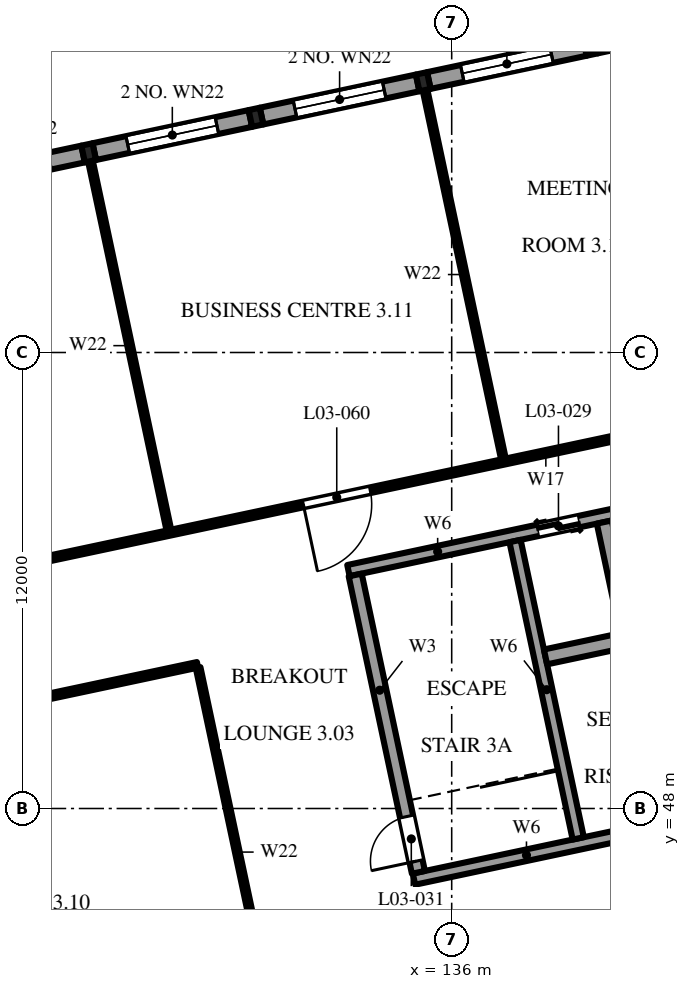
"""IFC4 building model, lengths in metres.
Left out: names, types, materials, properties, quantities, classifications, styles, units other than length and angle.
Written with IfcOpenShell. Run it as: python <this file> out.ifc"""

import sys

from ifc_helpers import new_model, si_unit, direction, frame, frame_2d, origin, origin_2d, place, context, subcontext, project, spatial, polyline, rectangle, i_section, outline, extrude, element, fill, save


model = new_model("IFC4")
c1 = context("Model", 3, precision=1e-05, world=origin(), true_north=direction((0.0, 1.0)))
c2 = subcontext(c1, "Body", "Model", "MODEL_VIEW")
j1 = project(units=[si_unit("LENGTHUNIT", "METRE"), si_unit("PLANEANGLEUNIT", "RADIAN")], contexts=[c1])
p1 = place(None, origin())
s1 = spatial("IfcSite", under=j1, at=p1, CompositionType="ELEMENT")
p2 = place(p1, origin())
s2 = spatial("IfcBuilding", under=s1, at=p2, CompositionType="ELEMENT")
p3 = place(p2, frame((0.0, 0.0, 16.8)))
s3 = spatial("IfcBuildingStorey", under=s2, at=p3, CompositionType="ELEMENT", Elevation=16.8)
for number, where, z_axis, x_axis in (
    (1, (126.448, 65.254, 0.0), (0.0, 0.0, 1.0), (0.978, 0.208, 0.0)),
    (2, (130.849, 66.19, 0.0), (0.0, 0.0, 1.0), (0.978, 0.208, 0.0)),
    (3, (135.251, 67.126, 0.0), (0.0, 0.0, 1.0), (0.978, 0.208, 0.0)),
    (4, (139.653, 68.061, 0.0), (0.0, 0.0, 1.0), (0.978, 0.208, 0.0)),
):
    element("IfcColumn", number, at=place(p3, frame(where, z_axis=z_axis, x_axis=x_axis)), inside=s3, PredefinedType="COLUMN", context=c2, shape_type="SweptSolid", body=[
        extrude(i_section(OverallWidth=0.3, OverallDepth=0.45, WebThickness=0.014, FlangeThickness=0.026, FilletRadius=0.027, at=origin_2d()), origin(), (0.0, 0.0, 1.0), 4.8),
    ])
p4 = place(p3, frame((135.009, 46.142, 0.0), z_axis=(0.0, 0.0, 1.0), x_axis=(0.978147662755, 0.20791139903, 0.0)))
e5 = element("IfcWall", 5, at=p4, inside=s3, PredefinedType="SHEAR", context=c2, shape_type="SweptSolid", body=[
    extrude(outline(polyline([(0.0, 0.0), (13.7, 0.0), (13.7, 11.456), (0.0, 10.723), (0.0, 0.0)])), frame((0.0, 0.15, 0.0), z_axis=(0.0, -1.0, 0.0), x_axis=(1.0, 0.0, 0.0)), (0.0, 0.0, 1.0), 0.3),
])
p5 = place(p4, frame((6.35, 0.0, 0.0)))
e6 = element("IfcOpeningElement", 6, at=p5, cuts=e5, PredefinedType="OPENING", context=c2, shape_type="SweptSolid", body=[
    extrude(rectangle(XDim=1.0, YDim=2.1, at=frame_2d((0.5, 1.05))), frame((0.0, 0.16, 0.0), z_axis=(0.0, -1.0, 0.0), x_axis=(1.0, 0.0, 0.0)), (0.0, 0.0, 1.0), 0.32),
])
p6 = place(p3, frame((133.283, 54.26, 0.0), z_axis=(0.0, 0.0, 1.0), x_axis=(0.978147662755, 0.20791139903, 0.0)))
e7 = element("IfcWall", 7, at=p6, inside=s3, PredefinedType="SHEAR", context=c2, shape_type="SweptSolid", body=[
    extrude(outline(polyline([(0.0, 0.0), (13.7, 0.0), (13.7, 11.021), (0.0, 10.288), (0.0, 0.0)])), frame((0.0, 0.15, 0.0), z_axis=(0.0, -1.0, 0.0), x_axis=(1.0, 0.0, 0.0)), (0.0, 0.0, 1.0), 0.3),
])
p7 = place(p6, frame((5.1, 0.0, 0.0)))
e8 = element("IfcOpeningElement", 8, at=p7, cuts=e7, PredefinedType="OPENING", context=c2, shape_type="SweptSolid", body=[
    extrude(rectangle(XDim=1.1, YDim=2.1, at=frame_2d((0.55, 1.05))), frame((0.0, 0.16, 0.0), z_axis=(0.0, -1.0, 0.0), x_axis=(1.0, 0.0, 0.0)), (0.0, 0.0, 1.0), 0.32),
])
p8 = place(p6, frame((7.5, 0.0, 0.0)))
e9 = element("IfcOpeningElement", 9, at=p8, cuts=e7, PredefinedType="OPENING", context=c2, shape_type="SweptSolid", body=[
    extrude(rectangle(XDim=1.1, YDim=2.1, at=frame_2d((0.55, 1.05))), frame((0.0, 0.16, 0.0), z_axis=(0.0, -1.0, 0.0), x_axis=(1.0, 0.0, 0.0)), (0.0, 0.0, 1.0), 0.32),
])
p9 = place(p3, frame((135.124, 46.32, 0.0), z_axis=(0.0, 0.0, 1.0), x_axis=(-0.207886494942, 0.978152955943, 0.0)))
e10 = element("IfcWall", 10, at=p9, inside=s3, PredefinedType="SOLIDWALL", context=c2, shape_type="SweptSolid", body=[
    extrude(outline(polyline([(0.0, 0.0), (8.0, 0.0), (8.0, 10.304), (0.0, 10.723), (0.0, 0.0)])), frame((0.0, 0.175, 0.0), z_axis=(0.0, -1.0, 0.0), x_axis=(1.0, 0.0, 0.0)), (0.0, 0.0, 1.0), 0.35),
])
p10 = place(p9, frame((0.3, 0.0, 0.0)))
e11 = element("IfcOpeningElement", 11, at=p10, cuts=e10, PredefinedType="OPENING", context=c2, shape_type="SweptSolid", body=[
    extrude(rectangle(XDim=1.2, YDim=2.1, at=frame_2d((0.6, 1.05))), frame((0.0, 0.185, 0.0), z_axis=(0.0, -1.0, 0.0), x_axis=(1.0, 0.0, 0.0)), (0.0, 0.0, 1.0), 0.37),
])
p11 = place(p3, frame((139.33, 47.214, 0.0), z_axis=(0.0, 0.0, 1.0), x_axis=(-0.207915693476, 0.978146749934, 0.0)))
e12 = element("IfcWall", 12, at=p11, inside=s3, PredefinedType="SHEAR", context=c2, shape_type="SweptSolid", body=[
    extrude(outline(polyline([(0.0, 0.0), (8.0, 0.0), (8.0, 10.534), (0.0, 10.953), (0.0, 0.0)])), frame((0.0, 0.15, 0.0), z_axis=(0.0, -1.0, 0.0), x_axis=(1.0, 0.0, 0.0)), (0.0, 0.0, 1.0), 0.3),
])
p12 = place(p3, frame((140.638, 52.603, 0.0), z_axis=(0.0, 0.0, 1.0), x_axis=(-0.207917150959, 0.978146440129, 0.0)))
e13 = element("IfcWall", 13, at=p12, inside=s3, PredefinedType="SHEAR", context=c2, shape_type="SweptSolid", body=[
    extrude(outline(polyline([(0.0, 0.0), (3.0, 0.0), (3.0, 10.662), (0.0, 10.82), (0.0, 0.0)])), frame((0.0, 0.2, 0.0), z_axis=(0.0, -1.0, 0.0), x_axis=(1.0, 0.0, 0.0)), (0.0, 0.0, 1.0), 0.4),
])
p13 = place(p3, frame((138.469, 51.989, 0.0), z_axis=(0.0, 0.0, 1.0), x_axis=(0.978149611564, 0.20790223038, 0.0)))
e14 = element("IfcWall", 14, at=p13, inside=s3, PredefinedType="SHEAR", context=c2, shape_type="SweptSolid", body=[
    extrude(outline(polyline([(0.0, 0.0), (4.5, 0.0), (4.5, 10.948), (0.0, 10.707), (0.0, 0.0)])), frame((0.0, 0.2, 0.0), z_axis=(0.0, -1.0, 0.0), x_axis=(1.0, 0.0, 0.0)), (0.0, 0.0, 1.0), 0.4),
])
p14 = place(p3, frame((122.193, 64.35, 0.0), z_axis=(0.0, 0.0, 1.0), x_axis=(0.978155748334, 0.207873355681, 0.0)))
e15 = element("IfcWall", 15, at=p14, inside=s3, PredefinedType="SOLIDWALL", context=c2, shape_type="SweptSolid", body=[
    extrude(outline(polyline([(0.0, 0.0), (4.2, 0.0), (4.2, 10.707), (0.0, 10.482), (0.0, 0.0)])), frame((0.0, 0.225, 0.0), z_axis=(0.0, -1.0, 0.0), x_axis=(1.0, 0.0, 0.0)), (0.0, 0.0, 1.0), 0.45),
])
p15 = place(p14, frame((0.9, 0.0, 0.9)))
e16 = element("IfcOpeningElement", 16, at=p15, cuts=e15, PredefinedType="OPENING", context=c2, shape_type="SweptSolid", body=[
    extrude(rectangle(XDim=2.4, YDim=2.4, at=frame_2d((1.2, 1.2))), frame((0.0, 0.235, 0.0), z_axis=(0.0, -1.0, 0.0), x_axis=(1.0, 0.0, 0.0)), (0.0, 0.0, 1.0), 0.47),
])
p16 = place(p14, frame((0.9, 0.0, 5.1)))
e17 = element("IfcOpeningElement", 17, at=p16, cuts=e15, PredefinedType="OPENING", context=c2, shape_type="SweptSolid", body=[
    extrude(rectangle(XDim=2.4, YDim=2.4, at=frame_2d((1.2, 1.2))), frame((0.0, 0.235, 0.0), z_axis=(0.0, -1.0, 0.0), x_axis=(1.0, 0.0, 0.0)), (0.0, 0.0, 1.0), 0.47),
])
p17 = place(p3, frame((126.594, 65.286, 0.0), z_axis=(0.0, 0.0, 1.0), x_axis=(0.978143927149, 0.207928972925, 0.0)))
e18 = element("IfcWall", 18, at=p17, inside=s3, PredefinedType="SOLIDWALL", context=c2, shape_type="SweptSolid", body=[
    extrude(outline(polyline([(0.0, 0.0), (4.2, 0.0), (4.2, 10.947), (0.0, 10.723), (0.0, 0.0)])), frame((0.0, 0.225, 0.0), z_axis=(0.0, -1.0, 0.0), x_axis=(1.0, 0.0, 0.0)), (0.0, 0.0, 1.0), 0.45),
])
p18 = place(p17, frame((0.9, 0.0, 0.9)))
e19 = element("IfcOpeningElement", 19, at=p18, cuts=e18, PredefinedType="OPENING", context=c2, shape_type="SweptSolid", body=[
    extrude(rectangle(XDim=2.4, YDim=2.4, at=frame_2d((1.2, 1.2))), frame((0.0, 0.235, 0.0), z_axis=(0.0, -1.0, 0.0), x_axis=(1.0, 0.0, 0.0)), (0.0, 0.0, 1.0), 0.47),
])
p19 = place(p17, frame((0.9, 0.0, 5.1)))
e20 = element("IfcOpeningElement", 20, at=p19, cuts=e18, PredefinedType="OPENING", context=c2, shape_type="SweptSolid", body=[
    extrude(rectangle(XDim=2.4, YDim=2.4, at=frame_2d((1.2, 1.2))), frame((0.0, 0.235, 0.0), z_axis=(0.0, -1.0, 0.0), x_axis=(1.0, 0.0, 0.0)), (0.0, 0.0, 1.0), 0.47),
])
p20 = place(p3, frame((130.996, 66.221, 0.0), z_axis=(0.0, 0.0, 1.0), x_axis=(0.978143927149, 0.207928972925, 0.0)))
e21 = element("IfcWall", 21, at=p20, inside=s3, PredefinedType="SOLIDWALL", context=c2, shape_type="SweptSolid", body=[
    extrude(outline(polyline([(0.0, 0.0), (4.2, 0.0), (4.2, 11.188), (0.0, 10.963), (0.0, 0.0)])), frame((0.0, 0.225, 0.0), z_axis=(0.0, -1.0, 0.0), x_axis=(1.0, 0.0, 0.0)), (0.0, 0.0, 1.0), 0.45),
])
p21 = place(p20, frame((0.9, 0.0, 0.9)))
e22 = element("IfcOpeningElement", 22, at=p21, cuts=e21, PredefinedType="OPENING", context=c2, shape_type="SweptSolid", body=[
    extrude(rectangle(XDim=2.4, YDim=2.4, at=frame_2d((1.2, 1.2))), frame((0.0, 0.235, 0.0), z_axis=(0.0, -1.0, 0.0), x_axis=(1.0, 0.0, 0.0)), (0.0, 0.0, 1.0), 0.47),
])
p22 = place(p20, frame((0.9, 0.0, 5.1)))
e23 = element("IfcOpeningElement", 23, at=p22, cuts=e21, PredefinedType="OPENING", context=c2, shape_type="SweptSolid", body=[
    extrude(rectangle(XDim=2.4, YDim=2.4, at=frame_2d((1.2, 1.2))), frame((0.0, 0.235, 0.0), z_axis=(0.0, -1.0, 0.0), x_axis=(1.0, 0.0, 0.0)), (0.0, 0.0, 1.0), 0.47),
])
p23 = place(p3, frame((135.398, 67.157, 0.0), z_axis=(0.0, 0.0, 1.0), x_axis=(0.978146440129, 0.207917150959, 0.0)))
e24 = element("IfcWall", 24, at=p23, inside=s3, PredefinedType="SOLIDWALL", context=c2, shape_type="SweptSolid", body=[
    extrude(outline(polyline([(0.0, 0.0), (4.2, 0.0), (4.2, 11.429), (0.0, 11.204), (0.0, 0.0)])), frame((0.0, 0.225, 0.0), z_axis=(0.0, -1.0, 0.0), x_axis=(1.0, 0.0, 0.0)), (0.0, 0.0, 1.0), 0.45),
])
p24 = place(p23, frame((0.9, 0.0, 0.9)))
e25 = element("IfcOpeningElement", 25, at=p24, cuts=e24, PredefinedType="OPENING", context=c2, shape_type="SweptSolid", body=[
    extrude(rectangle(XDim=2.4, YDim=2.4, at=frame_2d((1.2, 1.2))), frame((0.0, 0.235, 0.0), z_axis=(0.0, -1.0, 0.0), x_axis=(1.0, 0.0, 0.0)), (0.0, 0.0, 1.0), 0.47),
])
p25 = place(p23, frame((0.9, 0.0, 5.1)))
e26 = element("IfcOpeningElement", 26, at=p25, cuts=e24, PredefinedType="OPENING", context=c2, shape_type="SweptSolid", body=[
    extrude(rectangle(XDim=2.4, YDim=2.4, at=frame_2d((1.2, 1.2))), frame((0.0, 0.235, 0.0), z_axis=(0.0, -1.0, 0.0), x_axis=(1.0, 0.0, 0.0)), (0.0, 0.0, 1.0), 0.47),
])
p26 = place(p3, frame((139.8, 68.093, 0.0), z_axis=(0.0, 0.0, 1.0), x_axis=(0.978155748334, 0.207873355681, 0.0)))
e27 = element("IfcWall", 27, at=p26, inside=s3, PredefinedType="SOLIDWALL", context=c2, shape_type="SweptSolid", body=[
    extrude(outline(polyline([(0.0, 0.0), (4.2, 0.0), (4.2, 11.67), (0.0, 11.445), (0.0, 0.0)])), frame((0.0, 0.225, 0.0), z_axis=(0.0, -1.0, 0.0), x_axis=(1.0, 0.0, 0.0)), (0.0, 0.0, 1.0), 0.45),
])
p27 = place(p26, frame((0.9, 0.0, 0.9)))
e28 = element("IfcOpeningElement", 28, at=p27, cuts=e27, PredefinedType="OPENING", context=c2, shape_type="SweptSolid", body=[
    extrude(rectangle(XDim=2.4, YDim=2.4, at=frame_2d((1.2, 1.2))), frame((0.0, 0.235, 0.0), z_axis=(0.0, -1.0, 0.0), x_axis=(1.0, 0.0, 0.0)), (0.0, 0.0, 1.0), 0.47),
])
p28 = place(p26, frame((0.9, 0.0, 5.1)))
e29 = element("IfcOpeningElement", 29, at=p28, cuts=e27, PredefinedType="OPENING", context=c2, shape_type="SweptSolid", body=[
    extrude(rectangle(XDim=2.4, YDim=2.4, at=frame_2d((1.2, 1.2))), frame((0.0, 0.235, 0.0), z_axis=(0.0, -1.0, 0.0), x_axis=(1.0, 0.0, 0.0)), (0.0, 0.0, 1.0), 0.47),
])
p29 = place(p3, frame((80.893, 41.489, 0.0), z_axis=(0.0, 0.0, 1.0), x_axis=(0.97814724207, 0.20791337819, 0.0)))
e30 = element("IfcWall", 30, at=p29, inside=s3, PredefinedType="PARTITIONING", context=c2, shape_type="SweptSolid", body=[
    extrude(outline(polyline([(0.0, 0.0), (49.5, 0.0), (49.5, 9.336), (0.0, 6.688), (0.0, 0.0)])), frame((0.0, 0.075, 0.0), z_axis=(0.0, -1.0, 0.0), x_axis=(1.0, 0.0, 0.0)), (0.0, 0.0, 1.0), 0.15),
])
p30 = place(p29, frame((5.85, 0.0, 0.0)))
e31 = element("IfcOpeningElement", 31, at=p30, cuts=e30, PredefinedType="OPENING", context=c2, shape_type="SweptSolid", body=[
    extrude(rectangle(XDim=1.8, YDim=2.1, at=frame_2d((0.9, 1.05))), frame((0.0, 0.085, 0.0), z_axis=(0.0, -1.0, 0.0), x_axis=(1.0, 0.0, 0.0)), (0.0, 0.0, 1.0), 0.17),
])
p31 = place(p29, frame((17.25, 0.0, 0.0)))
e32 = element("IfcOpeningElement", 32, at=p31, cuts=e30, PredefinedType="OPENING", context=c2, shape_type="SweptSolid", body=[
    extrude(rectangle(XDim=1.5, YDim=2.1, at=frame_2d((0.75, 1.05))), frame((0.0, 0.085, 0.0), z_axis=(0.0, -1.0, 0.0), x_axis=(1.0, 0.0, 0.0)), (0.0, 0.0, 1.0), 0.17),
])
p32 = place(p29, frame((28.35, 0.0, 0.0)))
e33 = element("IfcOpeningElement", 33, at=p32, cuts=e30, PredefinedType="OPENING", context=c2, shape_type="SweptSolid", body=[
    extrude(rectangle(XDim=1.8, YDim=2.1, at=frame_2d((0.9, 1.05))), frame((0.0, 0.085, 0.0), z_axis=(0.0, -1.0, 0.0), x_axis=(1.0, 0.0, 0.0)), (0.0, 0.0, 1.0), 0.17),
])
p33 = place(p29, frame((41.85, 0.0, 0.0)))
e34 = element("IfcOpeningElement", 34, at=p33, cuts=e30, PredefinedType="OPENING", context=c2, shape_type="SweptSolid", body=[
    extrude(rectangle(XDim=1.8, YDim=2.1, at=frame_2d((0.9, 1.05))), frame((0.0, 0.085, 0.0), z_axis=(0.0, -1.0, 0.0), x_axis=(1.0, 0.0, 0.0)), (0.0, 0.0, 1.0), 0.17),
])
p34 = place(p3, frame((131.391, 41.999, 0.0), z_axis=(0.0, 0.0, 1.0), x_axis=(-0.20790935802, 0.978148096582, 0.0)))
e35 = element("IfcWall", 35, at=p34, inside=s3, PredefinedType="PARTITIONING", context=c2, shape_type="SweptSolid", body=[
    extrude(outline(polyline([(0.0, 0.0), (9.925, 0.0), (9.925, 8.622), (0.0, 8.622), (0.0, 0.0)])), frame((0.0, 0.062, 0.0), z_axis=(0.0, -1.0, 0.0), x_axis=(1.0, 0.0, 0.0)), (0.0, 0.0, 1.0), 0.125),
])
p35 = place(p3, frame((115.369, 52.446, 0.0), z_axis=(0.0, 0.0, 1.0), x_axis=(0.978147680869, 0.207911313813, 0.0)))
e36 = element("IfcWall", 36, at=p35, inside=s3, PredefinedType="PARTITIONING", context=c2, shape_type="SweptSolid", body=[
    extrude(outline(polyline([(0.0, 0.0), (40.5, 0.0), (40.5, 10.595), (0.0, 8.428), (0.0, 0.0)])), frame((0.0, 0.075, 0.0), z_axis=(0.0, -1.0, 0.0), x_axis=(1.0, 0.0, 0.0)), (0.0, 0.0, 1.0), 0.15),
])
p36 = place(p35, frame((5.85, 0.0, 0.0)))
e37 = element("IfcOpeningElement", 37, at=p36, cuts=e36, PredefinedType="OPENING", context=c2, shape_type="SweptSolid", body=[
    extrude(rectangle(XDim=1.8, YDim=2.1, at=frame_2d((0.9, 1.05))), frame((0.0, 0.085, 0.0), z_axis=(0.0, -1.0, 0.0), x_axis=(1.0, 0.0, 0.0)), (0.0, 0.0, 1.0), 0.17),
])
p37 = place(p35, frame((17.1, 0.0, 0.0)))
e38 = element("IfcOpeningElement", 38, at=p37, cuts=e36, PredefinedType="OPENING", context=c2, shape_type="SweptSolid", body=[
    extrude(rectangle(XDim=1.8, YDim=2.1, at=frame_2d((0.9, 1.05))), frame((0.0, 0.085, 0.0), z_axis=(0.0, -1.0, 0.0), x_axis=(1.0, 0.0, 0.0)), (0.0, 0.0, 1.0), 0.17),
])
p38 = place(p35, frame((28.35, 0.0, 0.0)))
e39 = element("IfcOpeningElement", 39, at=p38, cuts=e36, PredefinedType="OPENING", context=c2, shape_type="SweptSolid", body=[
    extrude(rectangle(XDim=1.8, YDim=2.1, at=frame_2d((0.9, 1.05))), frame((0.0, 0.085, 0.0), z_axis=(0.0, -1.0, 0.0), x_axis=(1.0, 0.0, 0.0)), (0.0, 0.0, 1.0), 0.17),
])
p39 = place(p35, frame((37.75, 0.0, 0.0)))
e40 = element("IfcOpeningElement", 40, at=p39, cuts=e36, PredefinedType="OPENING", context=c2, shape_type="SweptSolid", body=[
    extrude(rectangle(XDim=1.0, YDim=2.1, at=frame_2d((0.5, 1.05))), frame((0.0, 0.085, 0.0), z_axis=(0.0, -1.0, 0.0), x_axis=(1.0, 0.0, 0.0)), (0.0, 0.0, 1.0), 0.17),
])
p40 = place(p3, frame((126.495, 65.034, 0.0), z_axis=(0.0, 0.0, 1.0), x_axis=(0.207904355568, -0.978149159861, 0.0)))
e41 = element("IfcWall", 41, at=p40, inside=s3, PredefinedType="PARTITIONING", context=c2, shape_type="SweptSolid", body=[
    extrude(outline(polyline([(0.0, 0.0), (9.925, 0.0), (9.925, 8.622), (0.0, 8.622), (0.0, 0.0)])), frame((0.0, 0.062, 0.0), z_axis=(0.0, -1.0, 0.0), x_axis=(1.0, 0.0, 0.0)), (0.0, 0.0, 1.0), 0.125),
])
p41 = place(p3, frame((135.298, 66.906, 0.0), z_axis=(0.0, 0.0, 1.0), x_axis=(0.20790935802, -0.978148096582, 0.0)))
e42 = element("IfcWall", 42, at=p41, inside=s3, PredefinedType="PARTITIONING", context=c2, shape_type="SweptSolid", body=[
    extrude(outline(polyline([(0.0, 0.0), (9.925, 0.0), (9.925, 9.403), (0.0, 9.108), (0.0, 0.0)])), frame((0.0, 0.062, 0.0), z_axis=(0.0, -1.0, 0.0), x_axis=(1.0, 0.0, 0.0)), (0.0, 0.0, 1.0), 0.125),
])
p42 = place(p18, origin())
e43 = element("IfcWindow", 43, at=p42, inside=s3, PartitioningType="SINGLE_PANEL", PredefinedType="WINDOW", context=c2, shape_type="SweptSolid", body=[
    extrude(rectangle(XDim=2.4, YDim=2.4, at=frame_2d((1.2, 1.2))), frame((0.0, 0.03, 0.0), z_axis=(0.0, -1.0, 0.0), x_axis=(1.0, 0.0, 0.0)), (0.0, 0.0, 1.0), 0.06),
])
fill(e19, e43)
p43 = place(p19, origin())
e44 = element("IfcWindow", 44, at=p43, inside=s3, PartitioningType="SINGLE_PANEL", PredefinedType="WINDOW", context=c2, shape_type="SweptSolid", body=[
    extrude(rectangle(XDim=2.4, YDim=2.4, at=frame_2d((1.2, 1.2))), frame((0.0, 0.03, 0.0), z_axis=(0.0, -1.0, 0.0), x_axis=(1.0, 0.0, 0.0)), (0.0, 0.0, 1.0), 0.06),
])
fill(e20, e44)
p44 = place(p21, origin())
e45 = element("IfcWindow", 45, at=p44, inside=s3, PartitioningType="SINGLE_PANEL", PredefinedType="WINDOW", context=c2, shape_type="SweptSolid", body=[
    extrude(rectangle(XDim=2.4, YDim=2.4, at=frame_2d((1.2, 1.2))), frame((0.0, 0.03, 0.0), z_axis=(0.0, -1.0, 0.0), x_axis=(1.0, 0.0, 0.0)), (0.0, 0.0, 1.0), 0.06),
])
fill(e22, e45)
p45 = place(p22, origin())
e46 = element("IfcWindow", 46, at=p45, inside=s3, PartitioningType="SINGLE_PANEL", PredefinedType="WINDOW", context=c2, shape_type="SweptSolid", body=[
    extrude(rectangle(XDim=2.4, YDim=2.4, at=frame_2d((1.2, 1.2))), frame((0.0, 0.03, 0.0), z_axis=(0.0, -1.0, 0.0), x_axis=(1.0, 0.0, 0.0)), (0.0, 0.0, 1.0), 0.06),
])
fill(e23, e46)
p46 = place(p24, origin())
e47 = element("IfcWindow", 47, at=p46, inside=s3, PartitioningType="SINGLE_PANEL", PredefinedType="WINDOW", context=c2, shape_type="SweptSolid", body=[
    extrude(rectangle(XDim=2.4, YDim=2.4, at=frame_2d((1.2, 1.2))), frame((0.0, 0.03, 0.0), z_axis=(0.0, -1.0, 0.0), x_axis=(1.0, 0.0, 0.0)), (0.0, 0.0, 1.0), 0.06),
])
fill(e25, e47)
p47 = place(p25, origin())
e48 = element("IfcWindow", 48, at=p47, inside=s3, PartitioningType="SINGLE_PANEL", PredefinedType="WINDOW", context=c2, shape_type="SweptSolid", body=[
    extrude(rectangle(XDim=2.4, YDim=2.4, at=frame_2d((1.2, 1.2))), frame((0.0, 0.03, 0.0), z_axis=(0.0, -1.0, 0.0), x_axis=(1.0, 0.0, 0.0)), (0.0, 0.0, 1.0), 0.06),
])
fill(e26, e48)
p48 = place(p7, origin())
e49 = element("IfcDoor", 49, at=p48, inside=s3, OperationType="DOUBLE_DOOR_SLIDING", PredefinedType="DOOR", context=c2, shape_type="SweptSolid", body=[
    extrude(rectangle(XDim=1.1, YDim=2.1, at=frame_2d((0.55, 1.05))), frame((0.0, 0.025, 0.0), z_axis=(0.0, -1.0, 0.0), x_axis=(1.0, 0.0, 0.0)), (0.0, 0.0, 1.0), 0.05),
])
fill(e8, e49)
p49 = place(p10, origin())
e50 = element("IfcDoor", 50, at=p49, inside=s3, OperationType="SINGLE_SWING_LEFT", PredefinedType="DOOR", context=c2, shape_type="SweptSolid", body=[
    extrude(rectangle(XDim=1.2, YDim=2.1, at=frame_2d((0.6, 1.05))), frame((0.0, 0.025, 0.0), z_axis=(0.0, -1.0, 0.0), x_axis=(1.0, 0.0, 0.0)), (0.0, 0.0, 1.0), 0.05),
])
fill(e11, e50)
p50 = place(p37, frame((1.8, 0.0, 0.0), z_axis=(0.0, 0.0, 1.0), x_axis=(-1.0, 0.0, 0.0)))
e51 = element("IfcDoor", 51, at=p50, inside=s3, OperationType="DOUBLE_DOOR_SINGLE_SWING", PredefinedType="DOOR", context=c2, shape_type="SweptSolid", body=[
    extrude(rectangle(XDim=1.8, YDim=2.1, at=frame_2d((0.9, 1.05))), frame((0.0, 0.025, 0.0), z_axis=(0.0, -1.0, 0.0), x_axis=(1.0, 0.0, 0.0)), (0.0, 0.0, 1.0), 0.05),
])
fill(e38, e51)
save(model, sys.argv[1])
